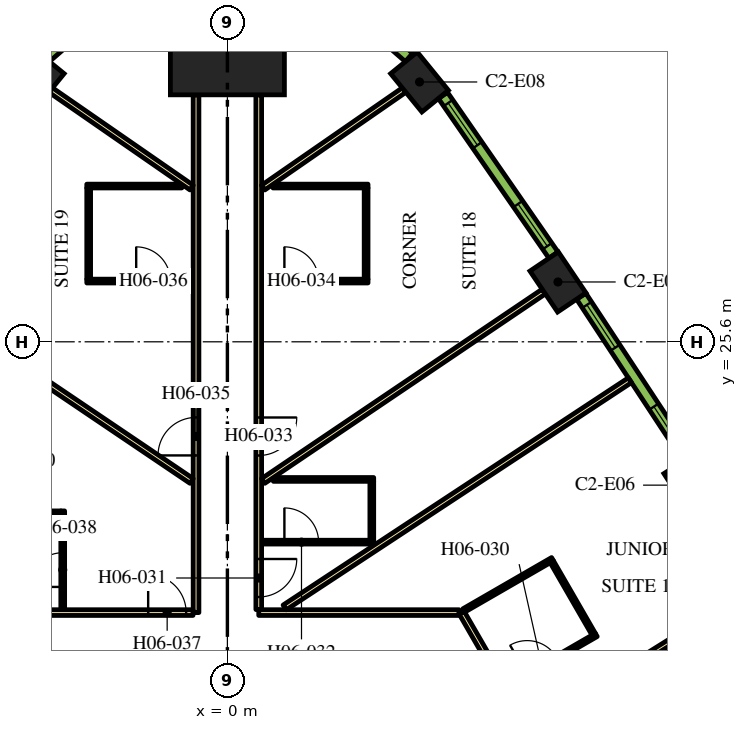
"""IFC4 building model, lengths in metres.
Left out: names, types, materials, properties, quantities, classifications, styles, units other than length and angle.
Written with IfcOpenShell. Run it as: python <this file> out.ifc"""

import sys

from ifc_helpers import new_model, si_unit, direction, frame, frame_2d, origin, origin_2d, place, context, subcontext, project, spatial, rectangle, extrude, element, fill, save


model = new_model("IFC4")
c1 = context("Model", 3, precision=1e-05, world=origin(), true_north=direction((0.0, 1.0)))
c2 = subcontext(c1, "Body", "Model", "MODEL_VIEW")
j1 = project(units=[si_unit("LENGTHUNIT", "METRE"), si_unit("PLANEANGLEUNIT", "RADIAN")], contexts=[c1])
p1 = place(None, origin())
s1 = spatial("IfcSite", under=j1, at=p1, CompositionType="ELEMENT")
p2 = place(p1, origin())
s2 = spatial("IfcBuilding", under=s1, at=p2, CompositionType="ELEMENT")
p3 = place(p2, frame((0.0, 0.0, 91.5)))
s3 = spatial("IfcBuildingStorey", under=s2, at=p3, CompositionType="ELEMENT", Elevation=91.5)
p4 = place(p3, frame((0.0, 33.598, 0.0), z_axis=(0.0, 0.0, 1.0), x_axis=(0.0, 1.0, 0.0)))
e1 = element("IfcColumn", 1, at=p4, inside=s3, PredefinedType="COLUMN", context=c2, shape_type="SweptSolid", body=[
    extrude(rectangle(XDim=3.0, YDim=3.0, at=origin_2d()), origin(), (0.0, 0.0, 1.0), 3.9),
])
for number, where, z_axis, x_axis in (
    (2, (12.217, 21.828, 0.0), (0.0, 0.0, 1.0), (-0.54, 0.842, 0.0)),
    (3, (8.699, 27.174, 0.0), (0.0, 0.0, 1.0), (-0.559, 0.829, 0.0)),
    (4, (5.056, 32.437, 0.0), (0.0, 0.0, 1.0), (-0.632, 0.775, 0.0)),
    (5, (-5.056, 32.437, 0.0), (0.0, 0.0, 1.0), (-0.632, -0.775, 0.0)),
):
    element("IfcColumn", number, at=place(p3, frame(where, z_axis=z_axis, x_axis=x_axis)), inside=s3, PredefinedType="COLUMN", context=c2, shape_type="SweptSolid", body=[
        extrude(rectangle(XDim=1.3, YDim=0.9, at=origin_2d()), origin(), (0.0, 0.0, 1.0), 3.9),
    ])
p5 = place(p3, frame((6.163, 18.475, 0.0), z_axis=(0.0, 0.0, 1.0), x_axis=(0.500001317485, -0.866024643133, 0.0)))
e6 = element("IfcWall", 6, at=p5, inside=s3, PredefinedType="PARTITIONING", context=c2, shape_type="SweptSolid", body=[
    extrude(rectangle(XDim=25.767, YDim=0.15, at=frame_2d((12.883, 0.0))), origin(), (0.0, 0.0, 1.0), 2.75),
])
p6 = place(p5, frame((24.241, 0.0, 0.0)))
e7 = element("IfcOpeningElement", 7, at=p6, cuts=e6, PredefinedType="OPENING", context=c2, shape_type="SweptSolid", body=[
    extrude(rectangle(XDim=1.0, YDim=2.1, at=frame_2d((0.5, 1.05))), frame((0.0, 0.085, 0.0), z_axis=(0.0, -1.0, 0.0), x_axis=(1.0, 0.0, 0.0)), (0.0, 0.0, 1.0), 0.17),
])
p7 = place(p5, frame((13.144, 0.0, 0.0)))
e8 = element("IfcOpeningElement", 8, at=p7, cuts=e6, PredefinedType="OPENING", context=c2, shape_type="SweptSolid", body=[
    extrude(rectangle(XDim=1.0, YDim=2.1, at=frame_2d((0.5, 1.05))), frame((0.0, 0.085, 0.0), z_axis=(0.0, -1.0, 0.0), x_axis=(1.0, 0.0, 0.0)), (0.0, 0.0, 1.0), 0.17),
])
p8 = place(p5, frame((10.874, 0.0, 0.0)))
e9 = element("IfcOpeningElement", 9, at=p8, cuts=e6, PredefinedType="OPENING", context=c2, shape_type="SweptSolid", body=[
    extrude(rectangle(XDim=0.9, YDim=2.1, at=frame_2d((0.45, 1.05))), frame((0.0, 0.085, 0.0), z_axis=(0.0, -1.0, 0.0), x_axis=(1.0, 0.0, 0.0)), (0.0, 0.0, 1.0), 0.17),
])
p9 = place(p5, frame((3.718, 0.0, 0.0)))
e10 = element("IfcOpeningElement", 10, at=p9, cuts=e6, PredefinedType="OPENING", context=c2, shape_type="SweptSolid", body=[
    extrude(rectangle(XDim=1.1, YDim=2.1, at=frame_2d((0.55, 1.05))), frame((0.0, 0.085, 0.0), z_axis=(0.0, -1.0, 0.0), x_axis=(1.0, 0.0, 0.0)), (0.0, 0.0, 1.0), 0.17),
])
p10 = place(p5, frame((2.411, 0.0, 0.0)))
e11 = element("IfcOpeningElement", 11, at=p10, cuts=e6, PredefinedType="OPENING", context=c2, shape_type="SweptSolid", body=[
    extrude(rectangle(XDim=1.0, YDim=2.1, at=frame_2d((0.5, 1.05))), frame((0.0, 0.085, 0.0), z_axis=(0.0, -1.0, 0.0), x_axis=(1.0, 0.0, 0.0)), (0.0, 0.0, 1.0), 0.17),
])
p11 = place(p3, frame((0.825, 18.475, 0.0), z_axis=(0.0, 0.0, 1.0), x_axis=(1.0, 0.0, 0.0)))
e12 = element("IfcWall", 12, at=p11, inside=s3, PredefinedType="PARTITIONING", context=c2, shape_type="SweptSolid", body=[
    extrude(rectangle(XDim=5.268, YDim=0.15, at=frame_2d((2.634, 0.0))), origin(), (0.0, 0.0, 1.0), 2.75),
])
p12 = place(p3, frame((0.825, 32.098, 0.0), z_axis=(0.0, 0.0, 1.0), x_axis=(0.0, -1.0, 0.0)))
e13 = element("IfcWall", 13, at=p12, inside=s3, PredefinedType="PARTITIONING", context=c2, shape_type="SweptSolid", body=[
    extrude(rectangle(XDim=13.543, YDim=0.15, at=frame_2d((6.772, 0.0))), origin(), (0.0, 0.0, 1.0), 2.75),
])
p13 = place(p12, frame((12.213, 0.0, 0.0)))
e14 = element("IfcOpeningElement", 14, at=p13, cuts=e13, PredefinedType="OPENING", context=c2, shape_type="SweptSolid", body=[
    extrude(rectangle(XDim=1.0, YDim=2.1, at=frame_2d((0.5, 1.05))), frame((0.0, 0.085, 0.0), z_axis=(0.0, -1.0, 0.0), x_axis=(1.0, 0.0, 0.0)), (0.0, 0.0, 1.0), 0.17),
])
p14 = place(p12, frame((8.49, 0.0, 0.0)))
e15 = element("IfcOpeningElement", 15, at=p14, cuts=e13, PredefinedType="OPENING", context=c2, shape_type="SweptSolid", body=[
    extrude(rectangle(XDim=1.0, YDim=2.1, at=frame_2d((0.5, 1.05))), frame((0.0, 0.085, 0.0), z_axis=(0.0, -1.0, 0.0), x_axis=(1.0, 0.0, 0.0)), (0.0, 0.0, 1.0), 0.17),
])
p15 = place(p3, frame((-0.825, 18.475, 0.0), z_axis=(0.0, 0.0, 1.0), x_axis=(0.0, 1.0, 0.0)))
e16 = element("IfcWall", 16, at=p15, inside=s3, PredefinedType="PARTITIONING", context=c2, shape_type="SweptSolid", body=[
    extrude(rectangle(XDim=13.623, YDim=0.15, at=frame_2d((6.812, 0.0))), origin(), (0.0, 0.0, 1.0), 2.75),
])
p16 = place(p15, frame((4.135, 0.0, 0.0)))
e17 = element("IfcOpeningElement", 17, at=p16, cuts=e16, PredefinedType="OPENING", context=c2, shape_type="SweptSolid", body=[
    extrude(rectangle(XDim=1.0, YDim=2.1, at=frame_2d((0.5, 1.05))), frame((0.0, 0.085, 0.0), z_axis=(0.0, -1.0, 0.0), x_axis=(1.0, 0.0, 0.0)), (0.0, 0.0, 1.0), 0.17),
])
p17 = place(p3, frame((-6.163, 18.475, 0.0), z_axis=(0.0, 0.0, 1.0), x_axis=(1.0, 0.0, 0.0)))
e18 = element("IfcWall", 18, at=p17, inside=s3, PredefinedType="PARTITIONING", context=c2, shape_type="SweptSolid", body=[
    extrude(rectangle(XDim=5.258, YDim=0.15, at=frame_2d((2.629, 0.0))), origin(), (0.0, 0.0, 1.0), 2.75),
])
p18 = place(p17, frame((4.078, 0.0, 0.0)))
e19 = element("IfcOpeningElement", 19, at=p18, cuts=e18, PredefinedType="OPENING", context=c2, shape_type="SweptSolid", body=[
    extrude(rectangle(XDim=1.0, YDim=2.1, at=frame_2d((0.5, 1.05))), frame((0.0, 0.085, 0.0), z_axis=(0.0, -1.0, 0.0), x_axis=(1.0, 0.0, 0.0)), (0.0, 0.0, 1.0), 0.17),
])
p19 = place(p3, frame((-8.326, 26.923, 0.0), z_axis=(0.0, 0.0, 1.0), x_axis=(0.828836601893, -0.5594907393, 0.0)))
e20 = element("IfcWall", 20, at=p19, inside=s3, PredefinedType="PARTITIONING", context=c2, shape_type="SweptSolid", body=[
    extrude(rectangle(XDim=8.909, YDim=0.15, at=frame_2d((4.455, 0.0))), origin(), (0.0, 0.0, 1.0), 2.75),
])
p20 = place(p3, frame((-4.649, 32.223, 0.0), z_axis=(0.0, 0.0, 1.0), x_axis=(0.822262349475, -0.569108626394, 0.0)))
e21 = element("IfcWall", 21, at=p20, inside=s3, PredefinedType="PARTITIONING", context=c2, shape_type="SweptSolid", body=[
    extrude(rectangle(XDim=4.51, YDim=0.15, at=frame_2d((2.255, 0.0))), origin(), (0.0, 0.0, 1.0), 2.75),
])
p21 = place(p3, frame((8.326, 26.923, 0.0), z_axis=(0.0, 0.0, 1.0), x_axis=(-0.828836601893, -0.5594907393, 0.0)))
e22 = element("IfcWall", 22, at=p21, inside=s3, PredefinedType="PARTITIONING", context=c2, shape_type="SweptSolid", body=[
    extrude(rectangle(XDim=8.909, YDim=0.15, at=frame_2d((4.455, 0.0))), origin(), (0.0, 0.0, 1.0), 2.75),
])
p22 = place(p3, frame((10.592, 24.589, 0.0), z_axis=(0.0, 0.0, 1.0), x_axis=(-0.835337323748, -0.549737715236, 0.0)))
e23 = element("IfcWall", 23, at=p22, inside=s3, PredefinedType="PARTITIONING", context=c2, shape_type="SweptSolid", body=[
    extrude(rectangle(XDim=10.875, YDim=0.15, at=frame_2d((5.438, 0.0))), origin(), (0.0, 0.0, 1.0), 2.75),
])
p23 = place(p3, frame((4.649, 32.223, 0.0), z_axis=(0.0, 0.0, 1.0), x_axis=(-0.822262349475, -0.569108626394, 0.0)))
e24 = element("IfcWall", 24, at=p23, inside=s3, PredefinedType="PARTITIONING", context=c2, shape_type="SweptSolid", body=[
    extrude(rectangle(XDim=4.51, YDim=0.15, at=frame_2d((2.255, 0.0))), origin(), (0.0, 0.0, 1.0), 2.75),
])
p24 = place(p3, frame((14.049, 19.2, 0.0), z_axis=(0.0, 0.0, 1.0), x_axis=(-0.847955867271, -0.530066832731, 0.0)))
e25 = element("IfcWall", 25, at=p24, inside=s3, PredefinedType="PARTITIONING", context=c2, shape_type="SweptSolid", body=[
    extrude(rectangle(XDim=7.111, YDim=0.15, at=frame_2d((3.556, 0.0))), origin(), (0.0, 0.0, 1.0), 2.75),
])
p25 = place(p3, frame((7.368, 16.538, 0.0), z_axis=(0.0, 0.0, 1.0), x_axis=(0.866036505625, 0.499980770555, 0.0)))
e26 = element("IfcWall", 26, at=p25, inside=s3, PredefinedType="PARTITIONING", context=c2, shape_type="SweptSolid", body=[
    extrude(rectangle(XDim=2.7, YDim=0.1, at=frame_2d((1.35, 0.0))), origin(), (0.0, 0.0, 1.0), 2.75),
])
p26 = place(p25, frame((0.6, 0.0, 0.0)))
e27 = element("IfcOpeningElement", 27, at=p26, cuts=e26, PredefinedType="OPENING", context=c2, shape_type="SweptSolid", body=[
    extrude(rectangle(XDim=0.9, YDim=2.1, at=frame_2d((0.45, 1.05))), frame((0.0, 0.06, 0.0), z_axis=(0.0, -1.0, 0.0), x_axis=(1.0, 0.0, 0.0)), (0.0, 0.0, 1.0), 0.12),
])
p27 = place(p3, frame((9.638, 17.906, 0.0), z_axis=(0.0, 0.0, 1.0), x_axis=(-0.50002983664, 0.866008176907, 0.0)))
e28 = element("IfcWall", 28, at=p27, inside=s3, PredefinedType="PARTITIONING", context=c2, shape_type="SweptSolid", body=[
    extrude(rectangle(XDim=2.2, YDim=0.1, at=frame_2d((1.1, 0.0))), origin(), (0.0, 0.0, 1.0), 2.75),
])
p28 = place(p3, frame((6.218, 18.53, 0.0), z_axis=(0.0, 0.0, 1.0), x_axis=(0.86599734893, 0.500048589285, 0.0)))
e29 = element("IfcWall", 29, at=p28, inside=s3, PredefinedType="PARTITIONING", context=c2, shape_type="SweptSolid", body=[
    extrude(rectangle(XDim=2.7, YDim=0.1, at=frame_2d((1.35, 0.0))), origin(), (0.0, 0.0, 1.0), 2.75),
])
p29 = place(p3, frame((0.9, 20.329, 0.0), z_axis=(0.0, 0.0, 1.0), x_axis=(1.0, 0.0, 0.0)))
e30 = element("IfcWall", 30, at=p29, inside=s3, PredefinedType="PARTITIONING", context=c2, shape_type="SweptSolid", body=[
    extrude(rectangle(XDim=2.95, YDim=0.1, at=frame_2d((1.475, 0.0))), origin(), (0.0, 0.0, 1.0), 2.75),
])
p30 = place(p29, frame((0.6, 0.0, 0.0)))
e31 = element("IfcOpeningElement", 31, at=p30, cuts=e30, PredefinedType="OPENING", context=c2, shape_type="SweptSolid", body=[
    extrude(rectangle(XDim=0.9, YDim=2.1, at=frame_2d((0.45, 1.05))), frame((0.0, 0.06, 0.0), z_axis=(0.0, -1.0, 0.0), x_axis=(1.0, 0.0, 0.0)), (0.0, 0.0, 1.0), 0.12),
])
p31 = place(p3, frame((3.8, 20.378, 0.0), z_axis=(0.0, 0.0, 1.0), x_axis=(0.0, 1.0, 0.0)))
e32 = element("IfcWall", 32, at=p31, inside=s3, PredefinedType="PARTITIONING", context=c2, shape_type="SweptSolid", body=[
    extrude(rectangle(XDim=1.55, YDim=0.1, at=frame_2d((0.775, 0.0))), origin(), (0.0, 0.0, 1.0), 2.75),
])
p32 = place(p3, frame((1.21, 21.979, 0.0), z_axis=(0.0, 0.0, 1.0), x_axis=(1.0, 0.0, 0.0)))
e33 = element("IfcWall", 33, at=p32, inside=s3, PredefinedType="PARTITIONING", context=c2, shape_type="SweptSolid", body=[
    extrude(rectangle(XDim=2.64, YDim=0.1, at=frame_2d((1.32, 0.0))), origin(), (0.0, 0.0, 1.0), 2.75),
])
p33 = place(p3, frame((0.9, 27.198, 0.0), z_axis=(0.0, 0.0, 1.0), x_axis=(1.0, 0.0, 0.0)))
e34 = element("IfcWall", 34, at=p33, inside=s3, PredefinedType="PARTITIONING", context=c2, shape_type="SweptSolid", body=[
    extrude(rectangle(XDim=2.8, YDim=0.1, at=frame_2d((1.4, 0.0))), origin(), (0.0, 0.0, 1.0), 2.75),
])
p34 = place(p33, frame((0.6, 0.0, 0.0)))
e35 = element("IfcOpeningElement", 35, at=p34, cuts=e34, PredefinedType="OPENING", context=c2, shape_type="SweptSolid", body=[
    extrude(rectangle(XDim=0.9, YDim=2.1, at=frame_2d((0.45, 1.05))), frame((0.0, 0.06, 0.0), z_axis=(0.0, -1.0, 0.0), x_axis=(1.0, 0.0, 0.0)), (0.0, 0.0, 1.0), 0.12),
])
p35 = place(p3, frame((3.65, 27.248, 0.0), z_axis=(0.0, 0.0, 1.0), x_axis=(0.0, 1.0, 0.0)))
e36 = element("IfcWall", 36, at=p35, inside=s3, PredefinedType="PARTITIONING", context=c2, shape_type="SweptSolid", body=[
    extrude(rectangle(XDim=2.4, YDim=0.1, at=frame_2d((1.2, 0.0))), origin(), (0.0, 0.0, 1.0), 2.75),
])
p36 = place(p3, frame((1.2, 29.698, 0.0), z_axis=(0.0, 0.0, 1.0), x_axis=(1.0, 0.0, 0.0)))
e37 = element("IfcWall", 37, at=p36, inside=s3, PredefinedType="PARTITIONING", context=c2, shape_type="SweptSolid", body=[
    extrude(rectangle(XDim=2.5, YDim=0.1, at=frame_2d((1.25, 0.0))), origin(), (0.0, 0.0, 1.0), 2.75),
])
p37 = place(p3, frame((-3.7, 27.198, 0.0), z_axis=(0.0, 0.0, 1.0), x_axis=(1.0, 0.0, 0.0)))
e38 = element("IfcWall", 38, at=p37, inside=s3, PredefinedType="PARTITIONING", context=c2, shape_type="SweptSolid", body=[
    extrude(rectangle(XDim=2.8, YDim=0.1, at=frame_2d((1.4, 0.0))), origin(), (0.0, 0.0, 1.0), 2.75),
])
p38 = place(p37, frame((1.3, 0.0, 0.0)))
e39 = element("IfcOpeningElement", 39, at=p38, cuts=e38, PredefinedType="OPENING", context=c2, shape_type="SweptSolid", body=[
    extrude(rectangle(XDim=0.9, YDim=2.1, at=frame_2d((0.45, 1.05))), frame((0.0, 0.06, 0.0), z_axis=(0.0, -1.0, 0.0), x_axis=(1.0, 0.0, 0.0)), (0.0, 0.0, 1.0), 0.12),
])
p39 = place(p3, frame((-3.65, 27.248, 0.0), z_axis=(0.0, 0.0, 1.0), x_axis=(0.0, 1.0, 0.0)))
e40 = element("IfcWall", 40, at=p39, inside=s3, PredefinedType="PARTITIONING", context=c2, shape_type="SweptSolid", body=[
    extrude(rectangle(XDim=2.4, YDim=0.1, at=frame_2d((1.2, 0.0))), origin(), (0.0, 0.0, 1.0), 2.75),
])
p40 = place(p3, frame((-1.2, 29.698, 0.0), z_axis=(0.0, 0.0, 1.0), x_axis=(-1.0, 0.0, 0.0)))
e41 = element("IfcWall", 41, at=p40, inside=s3, PredefinedType="PARTITIONING", context=c2, shape_type="SweptSolid", body=[
    extrude(rectangle(XDim=2.5, YDim=0.1, at=frame_2d((1.25, 0.0))), origin(), (0.0, 0.0, 1.0), 2.75),
])
p41 = place(p3, frame((-4.333, 18.55, 0.0), z_axis=(0.0, 0.0, 1.0), x_axis=(0.0, 1.0, 0.0)))
e42 = element("IfcWall", 42, at=p41, inside=s3, PredefinedType="PARTITIONING", context=c2, shape_type="SweptSolid", body=[
    extrude(rectangle(XDim=2.6, YDim=0.1, at=frame_2d((1.3, 0.0))), origin(), (0.0, 0.0, 1.0), 2.75),
])
p42 = place(p41, frame((0.6, 0.0, 0.0)))
e43 = element("IfcOpeningElement", 43, at=p42, cuts=e42, PredefinedType="OPENING", context=c2, shape_type="SweptSolid", body=[
    extrude(rectangle(XDim=0.9, YDim=2.1, at=frame_2d((0.45, 1.05))), frame((0.0, 0.06, 0.0), z_axis=(0.0, -1.0, 0.0), x_axis=(1.0, 0.0, 0.0)), (0.0, 0.0, 1.0), 0.12),
])
p43 = place(p3, frame((-4.383, 21.1, 0.0), z_axis=(0.0, 0.0, 1.0), x_axis=(-1.0, 0.0, 0.0)))
e44 = element("IfcWall", 44, at=p43, inside=s3, PredefinedType="PARTITIONING", context=c2, shape_type="SweptSolid", body=[
    extrude(rectangle(XDim=1.75, YDim=0.1, at=frame_2d((0.875, 0.0))), origin(), (0.0, 0.0, 1.0), 2.75),
])
p44 = place(p3, frame((12.115, 22.539, 0.0), z_axis=(0.0, 0.0, 1.0), x_axis=(-0.549741341923, 0.835334937005, 0.0)))
e45 = element("IfcWall", 45, at=p44, inside=s3, PredefinedType="SOLIDWALL", context=c2, shape_type="SweptSolid", body=[
    extrude(rectangle(XDim=5.1, YDim=0.29, at=frame_2d((2.55, 0.0))), origin(), (0.0, 0.0, 1.0), 3.65),
])
p45 = place(p44, frame((0.273, 0.0, 0.9)))
e46 = element("IfcOpeningElement", 46, at=p45, cuts=e45, PredefinedType="OPENING", context=c2, shape_type="SweptSolid", body=[
    extrude(rectangle(XDim=1.35, YDim=2.15, at=frame_2d((0.675, 1.075))), frame((0.0, 0.155, 0.0), z_axis=(0.0, -1.0, 0.0), x_axis=(1.0, 0.0, 0.0)), (0.0, 0.0, 1.0), 0.31),
])
p46 = place(p44, frame((3.478, 0.0, 0.9)))
e47 = element("IfcOpeningElement", 47, at=p46, cuts=e45, PredefinedType="OPENING", context=c2, shape_type="SweptSolid", body=[
    extrude(rectangle(XDim=1.35, YDim=2.15, at=frame_2d((0.675, 1.075))), frame((0.0, 0.155, 0.0), z_axis=(0.0, -1.0, 0.0), x_axis=(1.0, 0.0, 0.0)), (0.0, 0.0, 1.0), 0.31),
])
p47 = place(p3, frame((8.58, 27.882, 0.0), z_axis=(0.0, 0.0, 1.0), x_axis=(-0.569113019126, 0.822259309136, 0.0)))
e48 = element("IfcWall", 48, at=p47, inside=s3, PredefinedType="SOLIDWALL", context=c2, shape_type="SweptSolid", body=[
    extrude(rectangle(XDim=5.107, YDim=0.29, at=frame_2d((2.553, 0.0))), origin(), (0.0, 0.0, 1.0), 3.65),
])
p48 = place(p47, frame((0.285, 0.0, 0.9)))
e49 = element("IfcOpeningElement", 49, at=p48, cuts=e48, PredefinedType="OPENING", context=c2, shape_type="SweptSolid", body=[
    extrude(rectangle(XDim=1.35, YDim=2.15, at=frame_2d((0.675, 1.075))), frame((0.0, 0.155, 0.0), z_axis=(0.0, -1.0, 0.0), x_axis=(1.0, 0.0, 0.0)), (0.0, 0.0, 1.0), 0.31),
])
p49 = place(p47, frame((3.516, 0.0, 0.9)))
e50 = element("IfcOpeningElement", 50, at=p49, cuts=e48, PredefinedType="OPENING", context=c2, shape_type="SweptSolid", body=[
    extrude(rectangle(XDim=1.35, YDim=2.15, at=frame_2d((0.675, 1.075))), frame((0.0, 0.155, 0.0), z_axis=(0.0, -1.0, 0.0), x_axis=(1.0, 0.0, 0.0)), (0.0, 0.0, 1.0), 0.31),
])
p50 = place(p3, frame((4.778, 33.082, 0.0), z_axis=(0.0, 0.0, 1.0), x_axis=(-0.754882764627, 0.655859749999, 0.0)))
e51 = element("IfcWall", 51, at=p50, inside=s3, PredefinedType="SOLIDWALL", context=c2, shape_type="SweptSolid", body=[
    extrude(rectangle(XDim=1.82, YDim=0.29, at=frame_2d((0.91, 0.0))), origin(), (0.0, 0.0, 1.0), 3.65),
])
p51 = place(p50, frame((0.46, 0.0, 0.9)))
e52 = element("IfcOpeningElement", 52, at=p51, cuts=e51, PredefinedType="OPENING", context=c2, shape_type="SweptSolid", body=[
    extrude(rectangle(XDim=0.9, YDim=2.15, at=frame_2d((0.45, 1.075))), frame((0.0, 0.155, 0.0), z_axis=(0.0, -1.0, 0.0), x_axis=(1.0, 0.0, 0.0)), (0.0, 0.0, 1.0), 0.31),
])
p52 = place(p3, frame((-3.405, 34.275, 0.0), z_axis=(0.0, 0.0, 1.0), x_axis=(-0.754882764627, -0.655859749999, 0.0)))
e53 = element("IfcWall", 53, at=p52, inside=s3, PredefinedType="SOLIDWALL", context=c2, shape_type="SweptSolid", body=[
    extrude(rectangle(XDim=1.82, YDim=0.29, at=frame_2d((0.91, 0.0))), origin(), (0.0, 0.0, 1.0), 3.65),
])
p53 = place(p52, frame((0.46, 0.0, 0.9)))
e54 = element("IfcOpeningElement", 54, at=p53, cuts=e53, PredefinedType="OPENING", context=c2, shape_type="SweptSolid", body=[
    extrude(rectangle(XDim=0.9, YDim=2.15, at=frame_2d((0.45, 1.075))), frame((0.0, 0.155, 0.0), z_axis=(0.0, -1.0, 0.0), x_axis=(1.0, 0.0, 0.0)), (0.0, 0.0, 1.0), 0.31),
])
p54 = place(p13, origin())
e55 = element("IfcDoor", 55, at=p54, inside=s3, OperationType="SINGLE_SWING_RIGHT", PredefinedType="DOOR", context=c2, shape_type="SweptSolid", body=[
    extrude(rectangle(XDim=1.0, YDim=2.1, at=frame_2d((0.5, 1.05))), frame((0.0, 0.025, 0.0), z_axis=(0.0, -1.0, 0.0), x_axis=(1.0, 0.0, 0.0)), (0.0, 0.0, 1.0), 0.05),
])
fill(e14, e55)
p55 = place(p30, origin())
e56 = element("IfcDoor", 56, at=p55, inside=s3, OperationType="SINGLE_SWING_LEFT", PredefinedType="DOOR", context=c2, shape_type="SweptSolid", body=[
    extrude(rectangle(XDim=0.9, YDim=2.1, at=frame_2d((0.45, 1.05))), frame((0.0, 0.025, 0.0), z_axis=(0.0, -1.0, 0.0), x_axis=(1.0, 0.0, 0.0)), (0.0, 0.0, 1.0), 0.05),
])
fill(e31, e56)
p56 = place(p14, origin())
e57 = element("IfcDoor", 57, at=p56, inside=s3, OperationType="SINGLE_SWING_RIGHT", PredefinedType="DOOR", context=c2, shape_type="SweptSolid", body=[
    extrude(rectangle(XDim=1.0, YDim=2.1, at=frame_2d((0.5, 1.05))), frame((0.0, 0.025, 0.0), z_axis=(0.0, -1.0, 0.0), x_axis=(1.0, 0.0, 0.0)), (0.0, 0.0, 1.0), 0.05),
])
fill(e15, e57)
p57 = place(p34, origin())
e58 = element("IfcDoor", 58, at=p57, inside=s3, OperationType="SINGLE_SWING_RIGHT", PredefinedType="DOOR", context=c2, shape_type="SweptSolid", body=[
    extrude(rectangle(XDim=0.9, YDim=2.1, at=frame_2d((0.45, 1.05))), frame((0.0, 0.025, 0.0), z_axis=(0.0, -1.0, 0.0), x_axis=(1.0, 0.0, 0.0)), (0.0, 0.0, 1.0), 0.05),
])
fill(e35, e58)
p58 = place(p16, origin())
e59 = element("IfcDoor", 59, at=p58, inside=s3, OperationType="SINGLE_SWING_LEFT", PredefinedType="DOOR", context=c2, shape_type="SweptSolid", body=[
    extrude(rectangle(XDim=1.0, YDim=2.1, at=frame_2d((0.5, 1.05))), frame((0.0, 0.025, 0.0), z_axis=(0.0, -1.0, 0.0), x_axis=(1.0, 0.0, 0.0)), (0.0, 0.0, 1.0), 0.05),
])
fill(e17, e59)
p59 = place(p38, origin())
e60 = element("IfcDoor", 60, at=p59, inside=s3, OperationType="SINGLE_SWING_LEFT", PredefinedType="DOOR", context=c2, shape_type="SweptSolid", body=[
    extrude(rectangle(XDim=0.9, YDim=2.1, at=frame_2d((0.45, 1.05))), frame((0.0, 0.025, 0.0), z_axis=(0.0, -1.0, 0.0), x_axis=(1.0, 0.0, 0.0)), (0.0, 0.0, 1.0), 0.05),
])
fill(e39, e60)
p60 = place(p18, origin())
e61 = element("IfcDoor", 61, at=p60, inside=s3, OperationType="SINGLE_SWING_RIGHT", PredefinedType="DOOR", context=c2, shape_type="SweptSolid", body=[
    extrude(rectangle(XDim=1.0, YDim=2.1, at=frame_2d((0.5, 1.05))), frame((0.0, 0.025, 0.0), z_axis=(0.0, -1.0, 0.0), x_axis=(1.0, 0.0, 0.0)), (0.0, 0.0, 1.0), 0.05),
])
fill(e19, e61)
p61 = place(p42, origin())
e62 = element("IfcDoor", 62, at=p61, inside=s3, OperationType="SINGLE_SWING_LEFT", PredefinedType="DOOR", context=c2, shape_type="SweptSolid", body=[
    extrude(rectangle(XDim=0.9, YDim=2.1, at=frame_2d((0.45, 1.05))), frame((0.0, 0.025, 0.0), z_axis=(0.0, -1.0, 0.0), x_axis=(1.0, 0.0, 0.0)), (0.0, 0.0, 1.0), 0.05),
])
fill(e43, e62)
p62 = place(p45, origin())
e63 = element("IfcWindow", 63, at=p62, inside=s3, PartitioningType="DOUBLE_PANEL_VERTICAL", PredefinedType="WINDOW", context=c2, shape_type="SweptSolid", body=[
    extrude(rectangle(XDim=1.35, YDim=2.15, at=frame_2d((0.675, 1.075))), frame((0.0, 0.015, 0.0), z_axis=(0.0, -1.0, 0.0), x_axis=(1.0, 0.0, 0.0)), (0.0, 0.0, 1.0), 0.06),
])
fill(e46, e63)
p63 = place(p46, origin())
e64 = element("IfcWindow", 64, at=p63, inside=s3, PartitioningType="DOUBLE_PANEL_VERTICAL", PredefinedType="WINDOW", context=c2, shape_type="SweptSolid", body=[
    extrude(rectangle(XDim=1.35, YDim=2.15, at=frame_2d((0.675, 1.075))), frame((0.0, 0.015, 0.0), z_axis=(0.0, -1.0, 0.0), x_axis=(1.0, 0.0, 0.0)), (0.0, 0.0, 1.0), 0.06),
])
fill(e47, e64)
p64 = place(p48, origin())
e65 = element("IfcWindow", 65, at=p64, inside=s3, PartitioningType="DOUBLE_PANEL_VERTICAL", PredefinedType="WINDOW", context=c2, shape_type="SweptSolid", body=[
    extrude(rectangle(XDim=1.35, YDim=2.15, at=frame_2d((0.675, 1.075))), frame((0.0, 0.015, 0.0), z_axis=(0.0, -1.0, 0.0), x_axis=(1.0, 0.0, 0.0)), (0.0, 0.0, 1.0), 0.06),
])
fill(e49, e65)
p65 = place(p49, origin())
e66 = element("IfcWindow", 66, at=p65, inside=s3, PartitioningType="DOUBLE_PANEL_VERTICAL", PredefinedType="WINDOW", context=c2, shape_type="SweptSolid", body=[
    extrude(rectangle(XDim=1.35, YDim=2.15, at=frame_2d((0.675, 1.075))), frame((0.0, 0.015, 0.0), z_axis=(0.0, -1.0, 0.0), x_axis=(1.0, 0.0, 0.0)), (0.0, 0.0, 1.0), 0.06),
])
fill(e50, e66)
save(model, sys.argv[1])
